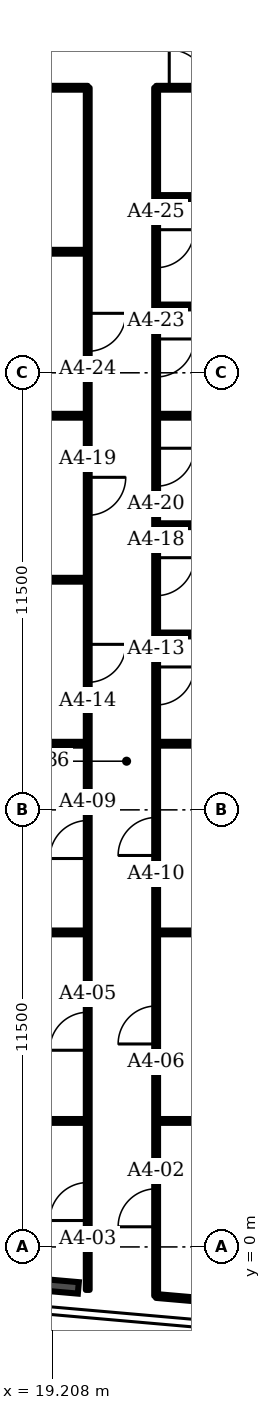
"""IFC4 building model, lengths in metres.
Left out: names, types, materials, properties, quantities, classifications, styles, units other than length and angle.
Written with IfcOpenShell. Run it as: python <this file> out.ifc"""

import sys

from ifc_helpers import new_model, si_unit, direction, frame, frame_2d, origin, origin_2d, place, context, subcontext, project, spatial, rectangle, i_section, extrude, element, fill, save


model = new_model("IFC4")
c1 = context("Model", 3, precision=1e-05, world=origin(), true_north=direction((0.0, 1.0)))
c2 = subcontext(c1, "Body", "Model", "MODEL_VIEW")
j1 = project(units=[si_unit("LENGTHUNIT", "METRE"), si_unit("PLANEANGLEUNIT", "RADIAN")], contexts=[c1])
p1 = place(None, origin())
s1 = spatial("IfcSite", under=j1, at=p1, CompositionType="ELEMENT")
p2 = place(p1, origin())
s2 = spatial("IfcBuilding", under=s1, at=p2, CompositionType="ELEMENT")
p3 = place(p2, frame((0.0, 0.0, 81.1)))
s3 = spatial("IfcBuildingStorey", under=s2, at=p3, CompositionType="ELEMENT", Elevation=81.1)
p4 = place(p3, frame((19.391, -1.034, 0.0), z_axis=(0.0, 0.0, 1.0), x_axis=(-0.087156, -0.996198, 0.0)))
e1 = element("IfcColumn", 1, at=p4, inside=s3, PredefinedType="COLUMN", context=c2, shape_type="SweptSolid", body=[
    extrude(i_section(OverallWidth=0.302, OverallDepth=1.008, WebThickness=0.021, FlangeThickness=0.04, FilletRadius=0.03, at=origin_2d()), origin(), (0.0, 0.0, 1.0), 3.6),
])
p5 = place(p3, frame((6.0, 8.275, 0.0), z_axis=(0.0, 0.0, 1.0), x_axis=(1.0, 0.0, 0.0)))
e2 = element("IfcWall", 2, at=p5, inside=s3, PredefinedType="PARTITIONING", context=c2, shape_type="SweptSolid", body=[
    extrude(rectangle(XDim=14.14, YDim=0.1, at=frame_2d((7.07, 0.0))), origin(), (0.0, 0.0, 1.0), 3.2),
])
p6 = place(p3, frame((6.02, 3.315, 0.0), z_axis=(0.0, 0.0, 1.0), x_axis=(1.0, 0.0, 0.0)))
e3 = element("IfcWall", 3, at=p6, inside=s3, PredefinedType="PARTITIONING", context=c2, shape_type="SweptSolid", body=[
    extrude(rectangle(XDim=14.12, YDim=0.1, at=frame_2d((7.06, 0.0))), origin(), (0.0, 0.0, 1.0), 3.2),
])
for number, where, z_axis, x_axis in (
    (4, (10.8, 21.87, 0.0), (0.0, 0.0, 1.0), (1.0, 0.0, 0.0)),
    (5, (10.8, 26.185, 0.0), (0.0, 0.0, 1.0), (1.0, 0.0, 0.0)),
):
    element("IfcWall", number, at=place(p3, frame(where, z_axis=z_axis, x_axis=x_axis)), inside=s3, PredefinedType="PARTITIONING", context=c2, shape_type="SweptSolid", body=[
        extrude(rectangle(XDim=9.34, YDim=0.1, at=frame_2d((4.67, 0.0))), origin(), (0.0, 0.0, 1.0), 3.2),
    ])
p7 = place(p3, frame((10.8, 30.5, 0.0), z_axis=(0.0, 0.0, 1.0), x_axis=(1.0, 0.0, 0.0)))
e6 = element("IfcWall", 6, at=p7, inside=s3, PredefinedType="PARTITIONING", context=c2, shape_type="SweptSolid", body=[
    extrude(rectangle(XDim=9.34, YDim=0.1, at=frame_2d((4.67, 0.0))), origin(), (0.0, 0.0, 1.0), 3.2),
])
p8 = place(p7, frame((4.185, 0.0, 0.0)))
e7 = element("IfcOpeningElement", 7, at=p8, cuts=e6, PredefinedType="OPENING", context=c2, shape_type="SweptSolid", body=[
    extrude(rectangle(XDim=1.0, YDim=2.1, at=frame_2d((0.5, 1.05))), frame((0.0, 0.06, 0.0), z_axis=(0.0, -1.0, 0.0), x_axis=(1.0, 0.0, 0.0)), (0.0, 0.0, 1.0), 0.12),
])
for number, where, z_axis, x_axis in (
    (8, (11.17, 13.24, 0.0), (0.0, 0.0, 1.0), (1.0, 0.0, 0.0)),
    (9, (11.17, 17.555, 0.0), (0.0, 0.0, 1.0), (1.0, 0.0, 0.0)),
):
    element("IfcWall", number, at=place(p3, frame(where, z_axis=z_axis, x_axis=x_axis)), inside=s3, PredefinedType="PARTITIONING", context=c2, shape_type="SweptSolid", body=[
        extrude(rectangle(XDim=8.97, YDim=0.1, at=frame_2d((4.485, 0.0))), origin(), (0.0, 0.0, 1.0), 3.2),
    ])
p9 = place(p3, frame((20.14, -1.13, 0.0), z_axis=(0.0, 0.0, 1.0), x_axis=(0.0, 1.0, 0.0)))
e10 = element("IfcWall", 10, at=p9, inside=s3, PredefinedType="PARTITIONING", context=c2, shape_type="SweptSolid", body=[
    extrude(rectangle(XDim=31.63, YDim=0.1, at=frame_2d((15.815, 0.0))), origin(), (0.0, 0.0, 1.0), 3.2),
])
p10 = place(p9, frame((1.825, 0.0, 0.0)))
e11 = element("IfcOpeningElement", 11, at=p10, cuts=e10, PredefinedType="OPENING", context=c2, shape_type="SweptSolid", body=[
    extrude(rectangle(XDim=1.0, YDim=2.1, at=frame_2d((0.5, 1.05))), frame((0.0, 0.06, 0.0), z_axis=(0.0, -1.0, 0.0), x_axis=(1.0, 0.0, 0.0)), (0.0, 0.0, 1.0), 0.12),
])
p11 = place(p9, frame((6.305, 0.0, 0.0)))
e12 = element("IfcOpeningElement", 12, at=p11, cuts=e10, PredefinedType="OPENING", context=c2, shape_type="SweptSolid", body=[
    extrude(rectangle(XDim=1.0, YDim=2.1, at=frame_2d((0.5, 1.05))), frame((0.0, 0.06, 0.0), z_axis=(0.0, -1.0, 0.0), x_axis=(1.0, 0.0, 0.0)), (0.0, 0.0, 1.0), 0.12),
])
p12 = place(p9, frame((11.35, 0.0, 0.0)))
e13 = element("IfcOpeningElement", 13, at=p12, cuts=e10, PredefinedType="OPENING", context=c2, shape_type="SweptSolid", body=[
    extrude(rectangle(XDim=1.0, YDim=2.1, at=frame_2d((0.5, 1.05))), frame((0.0, 0.06, 0.0), z_axis=(0.0, -1.0, 0.0), x_axis=(1.0, 0.0, 0.0)), (0.0, 0.0, 1.0), 0.12),
])
p13 = place(p9, frame((15.985, 0.0, 0.0)))
e14 = element("IfcOpeningElement", 14, at=p13, cuts=e10, PredefinedType="OPENING", context=c2, shape_type="SweptSolid", body=[
    extrude(rectangle(XDim=1.0, YDim=2.1, at=frame_2d((0.5, 1.05))), frame((0.0, 0.06, 0.0), z_axis=(0.0, -1.0, 0.0), x_axis=(1.0, 0.0, 0.0)), (0.0, 0.0, 1.0), 0.12),
])
p14 = place(p9, frame((20.38, 0.0, 0.0)))
e15 = element("IfcOpeningElement", 15, at=p14, cuts=e10, PredefinedType="OPENING", context=c2, shape_type="SweptSolid", body=[
    extrude(rectangle(XDim=1.0, YDim=2.1, at=frame_2d((0.5, 1.05))), frame((0.0, 0.06, 0.0), z_axis=(0.0, -1.0, 0.0), x_axis=(1.0, 0.0, 0.0)), (0.0, 0.0, 1.0), 0.12),
])
p15 = place(p9, frame((24.695, 0.0, 0.0)))
e16 = element("IfcOpeningElement", 16, at=p15, cuts=e10, PredefinedType="OPENING", context=c2, shape_type="SweptSolid", body=[
    extrude(rectangle(XDim=1.0, YDim=2.1, at=frame_2d((0.5, 1.05))), frame((0.0, 0.06, 0.0), z_axis=(0.0, -1.0, 0.0), x_axis=(1.0, 0.0, 0.0)), (0.0, 0.0, 1.0), 0.12),
])
p16 = place(p3, frame((21.94, -1.29, 0.0), z_axis=(0.0, 0.0, 1.0), x_axis=(0.0, 1.0, 0.0)))
e17 = element("IfcWall", 17, at=p16, inside=s3, PredefinedType="PARTITIONING", context=c2, shape_type="SweptSolid", body=[
    extrude(rectangle(XDim=31.79, YDim=0.1, at=frame_2d((15.895, 0.0))), origin(), (0.0, 0.0, 1.0), 3.2),
])
p17 = place(p16, frame((1.82, 0.0, 0.0)))
e18 = element("IfcOpeningElement", 18, at=p17, cuts=e17, PredefinedType="OPENING", context=c2, shape_type="SweptSolid", body=[
    extrude(rectangle(XDim=1.0, YDim=2.1, at=frame_2d((0.5, 1.05))), frame((0.0, 0.06, 0.0), z_axis=(0.0, -1.0, 0.0), x_axis=(1.0, 0.0, 0.0)), (0.0, 0.0, 1.0), 0.12),
])
p18 = place(p16, frame((6.63, 0.0, 0.0)))
e19 = element("IfcOpeningElement", 19, at=p18, cuts=e17, PredefinedType="OPENING", context=c2, shape_type="SweptSolid", body=[
    extrude(rectangle(XDim=1.0, YDim=2.1, at=frame_2d((0.5, 1.05))), frame((0.0, 0.06, 0.0), z_axis=(0.0, -1.0, 0.0), x_axis=(1.0, 0.0, 0.0)), (0.0, 0.0, 1.0), 0.12),
])
p19 = place(p16, frame((11.59, 0.0, 0.0)))
e20 = element("IfcOpeningElement", 20, at=p19, cuts=e17, PredefinedType="OPENING", context=c2, shape_type="SweptSolid", body=[
    extrude(rectangle(XDim=1.0, YDim=2.1, at=frame_2d((0.5, 1.05))), frame((0.0, 0.06, 0.0), z_axis=(0.0, -1.0, 0.0), x_axis=(1.0, 0.0, 0.0)), (0.0, 0.0, 1.0), 0.12),
])
p20 = place(p16, frame((15.55, 0.0, 0.0)))
e21 = element("IfcOpeningElement", 21, at=p20, cuts=e17, PredefinedType="OPENING", context=c2, shape_type="SweptSolid", body=[
    extrude(rectangle(XDim=1.0, YDim=2.1, at=frame_2d((0.5, 1.05))), frame((0.0, 0.06, 0.0), z_axis=(0.0, -1.0, 0.0), x_axis=(1.0, 0.0, 0.0)), (0.0, 0.0, 1.0), 0.12),
])
p21 = place(p16, frame((18.425, 0.0, 0.0)))
e22 = element("IfcOpeningElement", 22, at=p21, cuts=e17, PredefinedType="OPENING", context=c2, shape_type="SweptSolid", body=[
    extrude(rectangle(XDim=1.0, YDim=2.1, at=frame_2d((0.5, 1.05))), frame((0.0, 0.06, 0.0), z_axis=(0.0, -1.0, 0.0), x_axis=(1.0, 0.0, 0.0)), (0.0, 0.0, 1.0), 0.12),
])
p22 = place(p16, frame((21.305, 0.0, 0.0)))
e23 = element("IfcOpeningElement", 23, at=p22, cuts=e17, PredefinedType="OPENING", context=c2, shape_type="SweptSolid", body=[
    extrude(rectangle(XDim=1.0, YDim=2.1, at=frame_2d((0.5, 1.05))), frame((0.0, 0.06, 0.0), z_axis=(0.0, -1.0, 0.0), x_axis=(1.0, 0.0, 0.0)), (0.0, 0.0, 1.0), 0.12),
])
p23 = place(p16, frame((24.18, 0.0, 0.0)))
e24 = element("IfcOpeningElement", 24, at=p23, cuts=e17, PredefinedType="OPENING", context=c2, shape_type="SweptSolid", body=[
    extrude(rectangle(XDim=1.0, YDim=2.1, at=frame_2d((0.5, 1.05))), frame((0.0, 0.06, 0.0), z_axis=(0.0, -1.0, 0.0), x_axis=(1.0, 0.0, 0.0)), (0.0, 0.0, 1.0), 0.12),
])
p24 = place(p16, frame((27.055, 0.0, 0.0)))
e25 = element("IfcOpeningElement", 25, at=p24, cuts=e17, PredefinedType="OPENING", context=c2, shape_type="SweptSolid", body=[
    extrude(rectangle(XDim=1.0, YDim=2.1, at=frame_2d((0.5, 1.05))), frame((0.0, 0.06, 0.0), z_axis=(0.0, -1.0, 0.0), x_axis=(1.0, 0.0, 0.0)), (0.0, 0.0, 1.0), 0.12),
])
for number, where, z_axis, x_axis in (
    (26, (21.94, 3.315, 0.0), (0.0, 0.0, 1.0), (1.0, 0.0, 0.0)),
    (27, (21.94, 8.275, 0.0), (0.0, 0.0, 1.0), (1.0, 0.0, 0.0)),
):
    element("IfcWall", number, at=place(p3, frame(where, z_axis=z_axis, x_axis=x_axis)), inside=s3, PredefinedType="PARTITIONING", context=c2, shape_type="SweptSolid", body=[
        extrude(rectangle(XDim=4.06, YDim=0.1, at=frame_2d((2.03, 0.0))), origin(), (0.0, 0.0, 1.0), 3.2),
    ])
for number, where, z_axis, x_axis in (
    (28, (21.94, 13.24, 0.0), (0.0, 0.0, 1.0), (1.0, 0.0, 0.0)),
    (29, (21.94, 16.115, 0.0), (0.0, 0.0, 1.0), (1.0, 0.0, 0.0)),
    (30, (21.94, 18.99, 0.0), (0.0, 0.0, 1.0), (1.0, 0.0, 0.0)),
    (31, (21.94, 21.87, 0.0), (0.0, 0.0, 1.0), (1.0, 0.0, 0.0)),
    (32, (21.94, 24.745, 0.0), (0.0, 0.0, 1.0), (1.0, 0.0, 0.0)),
    (33, (21.94, 27.625, 0.0), (0.0, 0.0, 1.0), (1.0, 0.0, 0.0)),
):
    element("IfcWall", number, at=place(p3, frame(where, z_axis=z_axis, x_axis=x_axis)), inside=s3, PredefinedType="PARTITIONING", context=c2, shape_type="SweptSolid", body=[
        extrude(rectangle(XDim=4.725, YDim=0.1, at=frame_2d((2.363, 0.0))), origin(), (0.0, 0.0, 1.0), 3.2),
    ])
p25 = place(p3, frame((21.94, 30.5, 0.0), z_axis=(0.0, 0.0, 1.0), x_axis=(1.0, 0.0, 0.0)))
e34 = element("IfcWall", 34, at=p25, inside=s3, PredefinedType="PARTITIONING", context=c2, shape_type="SweptSolid", body=[
    extrude(rectangle(XDim=14.91, YDim=0.1, at=frame_2d((7.455, 0.0))), origin(), (0.0, 0.0, 1.0), 3.2),
])
p26 = place(p25, frame((0.345, 0.0, 0.0)))
e35 = element("IfcOpeningElement", 35, at=p26, cuts=e34, PredefinedType="OPENING", context=c2, shape_type="SweptSolid", body=[
    extrude(rectangle(XDim=1.0, YDim=2.1, at=frame_2d((0.5, 1.05))), frame((0.0, 0.06, 0.0), z_axis=(0.0, -1.0, 0.0), x_axis=(1.0, 0.0, 0.0)), (0.0, 0.0, 1.0), 0.12),
])
p27 = place(p25, frame((8.95, 0.0, 0.0)))
e36 = element("IfcOpeningElement", 36, at=p27, cuts=e34, PredefinedType="OPENING", context=c2, shape_type="SweptSolid", body=[
    extrude(rectangle(XDim=1.8, YDim=2.1, at=frame_2d((0.9, 1.05))), frame((0.0, 0.06, 0.0), z_axis=(0.0, -1.0, 0.0), x_axis=(1.0, 0.0, 0.0)), (0.0, 0.0, 1.0), 0.12),
])
p28 = place(p3, frame((33.22, -2.275, 0.0), z_axis=(0.0, 0.0, 1.0), x_axis=(-0.996212, 0.086913, 0.0)))
e37 = element("IfcWall", 37, at=p28, inside=s3, PredefinedType="PARTITIONING", context=c2, shape_type="SweptSolid", body=[
    extrude(rectangle(XDim=11.323, YDim=0.1, at=frame_2d((5.662, 0.0))), origin(), (0.0, 0.0, 1.0), 2.58),
])
p29 = place(p17, origin())
e38 = element("IfcDoor", 38, at=p29, inside=s3, OperationType="SINGLE_SWING_LEFT", PredefinedType="DOOR", context=c2, shape_type="SweptSolid", body=[
    extrude(rectangle(XDim=1.0, YDim=2.1, at=frame_2d((0.5, 1.05))), frame((0.0, 0.025, 0.0), z_axis=(0.0, -1.0, 0.0), x_axis=(1.0, 0.0, 0.0)), (0.0, 0.0, 1.0), 0.05),
])
fill(e18, e38)
p30 = place(p10, origin())
e39 = element("IfcDoor", 39, at=p30, inside=s3, OperationType="SINGLE_SWING_LEFT", PredefinedType="DOOR", context=c2, shape_type="SweptSolid", body=[
    extrude(rectangle(XDim=1.0, YDim=2.1, at=frame_2d((0.5, 1.05))), frame((0.0, 0.025, 0.0), z_axis=(0.0, -1.0, 0.0), x_axis=(1.0, 0.0, 0.0)), (0.0, 0.0, 1.0), 0.05),
])
fill(e11, e39)
p31 = place(p11, origin())
e40 = element("IfcDoor", 40, at=p31, inside=s3, OperationType="SINGLE_SWING_LEFT", PredefinedType="DOOR", context=c2, shape_type="SweptSolid", body=[
    extrude(rectangle(XDim=1.0, YDim=2.1, at=frame_2d((0.5, 1.05))), frame((0.0, 0.025, 0.0), z_axis=(0.0, -1.0, 0.0), x_axis=(1.0, 0.0, 0.0)), (0.0, 0.0, 1.0), 0.05),
])
fill(e12, e40)
p32 = place(p18, origin())
e41 = element("IfcDoor", 41, at=p32, inside=s3, OperationType="SINGLE_SWING_LEFT", PredefinedType="DOOR", context=c2, shape_type="SweptSolid", body=[
    extrude(rectangle(XDim=1.0, YDim=2.1, at=frame_2d((0.5, 1.05))), frame((0.0, 0.025, 0.0), z_axis=(0.0, -1.0, 0.0), x_axis=(1.0, 0.0, 0.0)), (0.0, 0.0, 1.0), 0.05),
])
fill(e19, e41)
p33 = place(p12, origin())
e42 = element("IfcDoor", 42, at=p33, inside=s3, OperationType="SINGLE_SWING_LEFT", PredefinedType="DOOR", context=c2, shape_type="SweptSolid", body=[
    extrude(rectangle(XDim=1.0, YDim=2.1, at=frame_2d((0.5, 1.05))), frame((0.0, 0.025, 0.0), z_axis=(0.0, -1.0, 0.0), x_axis=(1.0, 0.0, 0.0)), (0.0, 0.0, 1.0), 0.05),
])
fill(e13, e42)
p34 = place(p19, origin())
e43 = element("IfcDoor", 43, at=p34, inside=s3, OperationType="SINGLE_SWING_LEFT", PredefinedType="DOOR", context=c2, shape_type="SweptSolid", body=[
    extrude(rectangle(XDim=1.0, YDim=2.1, at=frame_2d((0.5, 1.05))), frame((0.0, 0.025, 0.0), z_axis=(0.0, -1.0, 0.0), x_axis=(1.0, 0.0, 0.0)), (0.0, 0.0, 1.0), 0.05),
])
fill(e20, e43)
p35 = place(p20, origin())
e44 = element("IfcDoor", 44, at=p35, inside=s3, OperationType="SINGLE_SWING_RIGHT", PredefinedType="DOOR", context=c2, shape_type="SweptSolid", body=[
    extrude(rectangle(XDim=1.0, YDim=2.1, at=frame_2d((0.5, 1.05))), frame((0.0, 0.025, 0.0), z_axis=(0.0, -1.0, 0.0), x_axis=(1.0, 0.0, 0.0)), (0.0, 0.0, 1.0), 0.05),
])
fill(e21, e44)
p36 = place(p13, origin())
e45 = element("IfcDoor", 45, at=p36, inside=s3, OperationType="SINGLE_SWING_RIGHT", PredefinedType="DOOR", context=c2, shape_type="SweptSolid", body=[
    extrude(rectangle(XDim=1.0, YDim=2.1, at=frame_2d((0.5, 1.05))), frame((0.0, 0.025, 0.0), z_axis=(0.0, -1.0, 0.0), x_axis=(1.0, 0.0, 0.0)), (0.0, 0.0, 1.0), 0.05),
])
fill(e14, e45)
p37 = place(p21, origin())
e46 = element("IfcDoor", 46, at=p37, inside=s3, OperationType="SINGLE_SWING_RIGHT", PredefinedType="DOOR", context=c2, shape_type="SweptSolid", body=[
    extrude(rectangle(XDim=1.0, YDim=2.1, at=frame_2d((0.5, 1.05))), frame((0.0, 0.025, 0.0), z_axis=(0.0, -1.0, 0.0), x_axis=(1.0, 0.0, 0.0)), (0.0, 0.0, 1.0), 0.05),
])
fill(e22, e46)
p38 = place(p14, origin())
e47 = element("IfcDoor", 47, at=p38, inside=s3, OperationType="SINGLE_SWING_RIGHT", PredefinedType="DOOR", context=c2, shape_type="SweptSolid", body=[
    extrude(rectangle(XDim=1.0, YDim=2.1, at=frame_2d((0.5, 1.05))), frame((0.0, 0.025, 0.0), z_axis=(0.0, -1.0, 0.0), x_axis=(1.0, 0.0, 0.0)), (0.0, 0.0, 1.0), 0.05),
])
fill(e15, e47)
p39 = place(p22, origin())
e48 = element("IfcDoor", 48, at=p39, inside=s3, OperationType="SINGLE_SWING_RIGHT", PredefinedType="DOOR", context=c2, shape_type="SweptSolid", body=[
    extrude(rectangle(XDim=1.0, YDim=2.1, at=frame_2d((0.5, 1.05))), frame((0.0, 0.025, 0.0), z_axis=(0.0, -1.0, 0.0), x_axis=(1.0, 0.0, 0.0)), (0.0, 0.0, 1.0), 0.05),
])
fill(e23, e48)
p40 = place(p23, origin())
e49 = element("IfcDoor", 49, at=p40, inside=s3, OperationType="SINGLE_SWING_RIGHT", PredefinedType="DOOR", context=c2, shape_type="SweptSolid", body=[
    extrude(rectangle(XDim=1.0, YDim=2.1, at=frame_2d((0.5, 1.05))), frame((0.0, 0.025, 0.0), z_axis=(0.0, -1.0, 0.0), x_axis=(1.0, 0.0, 0.0)), (0.0, 0.0, 1.0), 0.05),
])
fill(e24, e49)
p41 = place(p15, origin())
e50 = element("IfcDoor", 50, at=p41, inside=s3, OperationType="SINGLE_SWING_RIGHT", PredefinedType="DOOR", context=c2, shape_type="SweptSolid", body=[
    extrude(rectangle(XDim=1.0, YDim=2.1, at=frame_2d((0.5, 1.05))), frame((0.0, 0.025, 0.0), z_axis=(0.0, -1.0, 0.0), x_axis=(1.0, 0.0, 0.0)), (0.0, 0.0, 1.0), 0.05),
])
fill(e16, e50)
p42 = place(p24, origin())
e51 = element("IfcDoor", 51, at=p42, inside=s3, OperationType="SINGLE_SWING_RIGHT", PredefinedType="DOOR", context=c2, shape_type="SweptSolid", body=[
    extrude(rectangle(XDim=1.0, YDim=2.1, at=frame_2d((0.5, 1.05))), frame((0.0, 0.025, 0.0), z_axis=(0.0, -1.0, 0.0), x_axis=(1.0, 0.0, 0.0)), (0.0, 0.0, 1.0), 0.05),
])
fill(e25, e51)
p43 = place(p26, origin())
e52 = element("IfcDoor", 52, at=p43, inside=s3, OperationType="SINGLE_SWING_LEFT", PredefinedType="DOOR", context=c2, shape_type="SweptSolid", body=[
    extrude(rectangle(XDim=1.0, YDim=2.1, at=frame_2d((0.5, 1.05))), frame((0.0, 0.025, 0.0), z_axis=(0.0, -1.0, 0.0), x_axis=(1.0, 0.0, 0.0)), (0.0, 0.0, 1.0), 0.05),
])
fill(e35, e52)
save(model, sys.argv[1])
